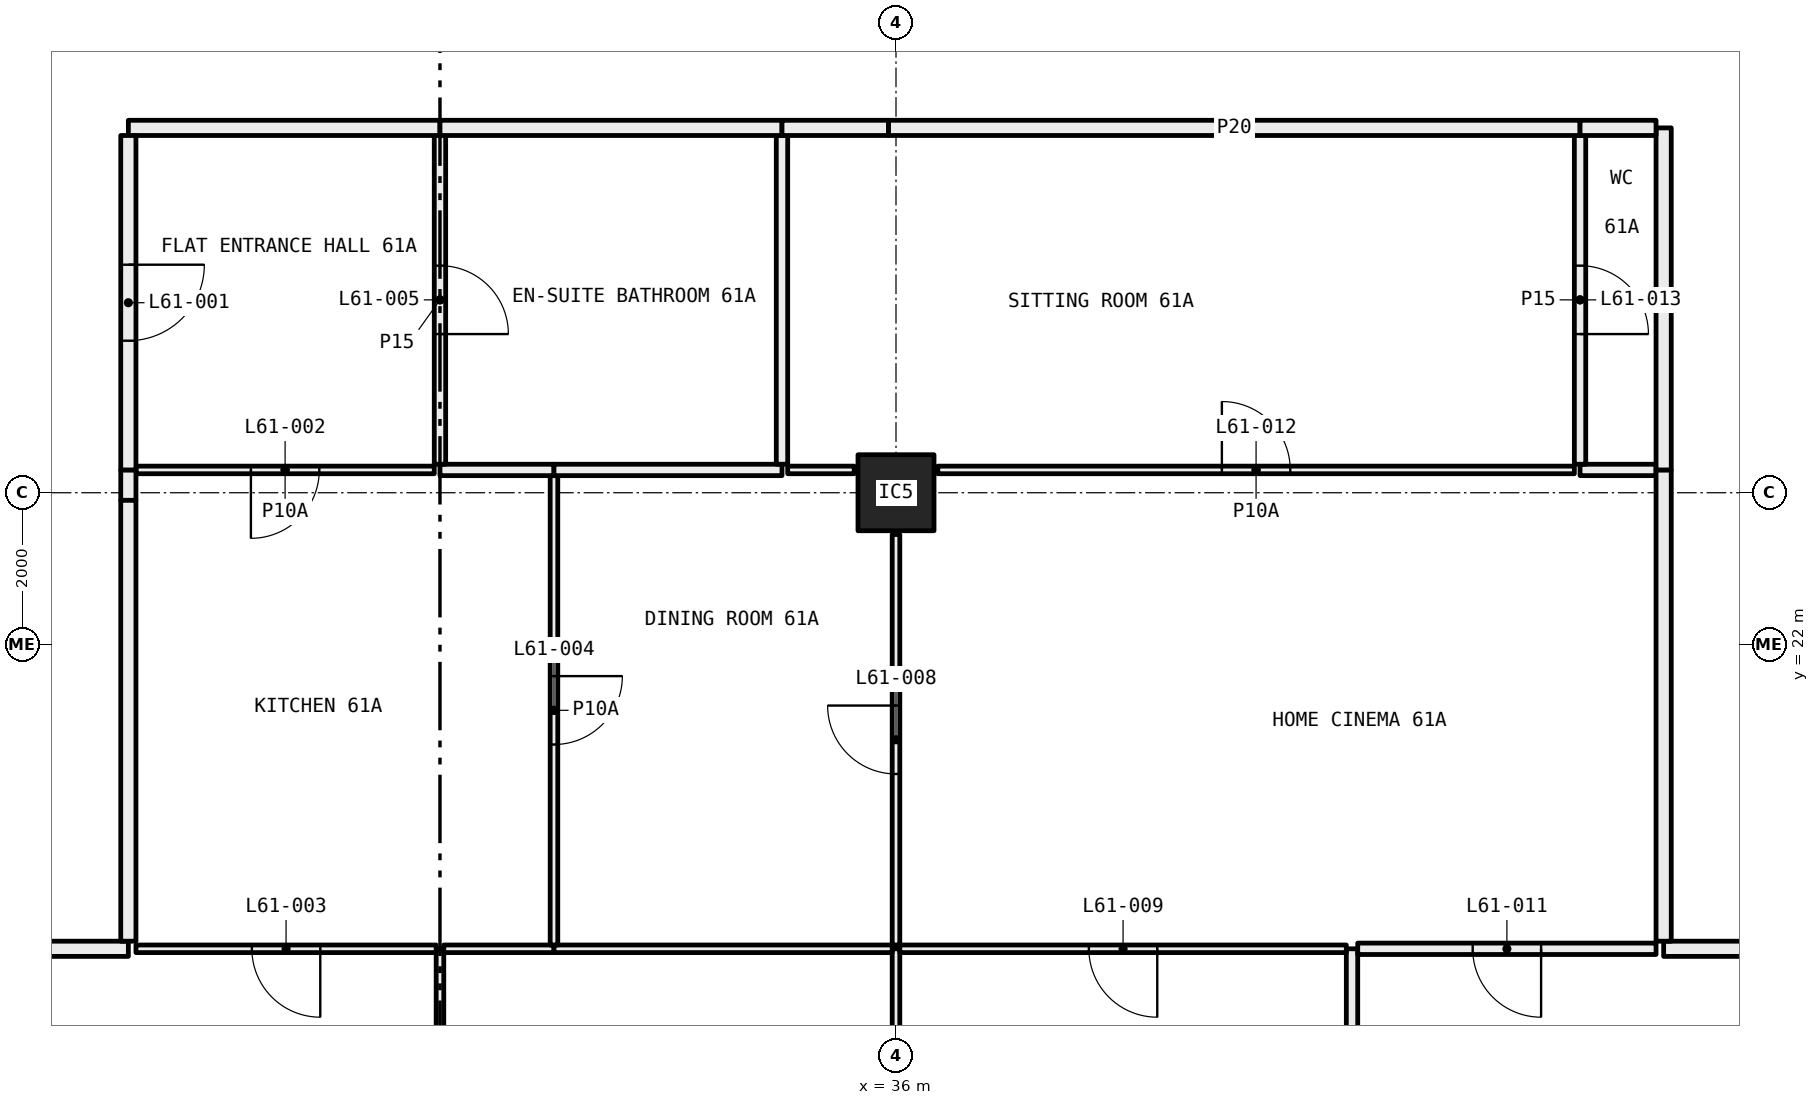
"""IFC4 building model, lengths in metres.
Left out: names, types, materials, properties, quantities, classifications, styles, units other than length and angle.
Written with IfcOpenShell. Run it as: python <this file> out.ifc"""

import sys

from ifc_helpers import new_model, si_unit, direction, frame, frame_2d, origin, origin_2d, place, context, subcontext, project, spatial, rectangle, hollow_rectangle, extrude, element, fill, save


model = new_model("IFC4")
c1 = context("Model", 3, precision=1e-05, world=origin(), true_north=direction((0.0, 1.0)))
c2 = subcontext(c1, "Body", "Model", "MODEL_VIEW")
j1 = project(units=[si_unit("LENGTHUNIT", "METRE"), si_unit("PLANEANGLEUNIT", "RADIAN")], contexts=[c1])
p1 = place(None, origin())
s1 = spatial("IfcSite", under=j1, at=p1, CompositionType="ELEMENT")
p2 = place(p1, origin())
s2 = spatial("IfcBuilding", under=s1, at=p2, CompositionType="ELEMENT")
p3 = place(p2, frame((0.0, 0.0, 228.3)))
s3 = spatial("IfcBuildingStorey", under=s2, at=p3, CompositionType="ELEMENT", Elevation=228.3)
p4 = place(p3, frame((36.0, 24.0, 0.0), z_axis=(0.0, 0.0, 1.0), x_axis=(1.0, 0.0, 0.0)))
e1 = element("IfcColumn", 1, at=p4, inside=s3, PredefinedType="COLUMN", context=c2, shape_type="SweptSolid", body=[
    extrude(hollow_rectangle(XDim=1.0, YDim=1.0, WallThickness=0.04, at=origin_2d()), origin(), (0.0, 0.0, 1.0), 3.05),
])
p5 = place(p3, frame((30.0, 12.72, 0.0), z_axis=(0.0, 0.0, 1.0), x_axis=(0.0, 1.0, 0.0)))
e2 = element("IfcWall", 2, at=p5, inside=s3, PredefinedType="PARTITIONING", context=c2, shape_type="SweptSolid", body=[
    extrude(rectangle(XDim=5.28, YDim=0.1, at=frame_2d((2.64, 0.0))), origin(), (0.0, 0.0, 1.0), 3.05),
])
p6 = place(p5, frame((2.19, 0.0, 0.0)))
e3 = element("IfcOpeningElement", 3, at=p6, cuts=e2, PredefinedType="OPENING", context=c2, shape_type="SweptSolid", body=[
    extrude(rectangle(XDim=0.9, YDim=2.1, at=frame_2d((0.45, 1.05))), frame((0.0, 0.06, 0.0), z_axis=(0.0, -1.0, 0.0), x_axis=(1.0, 0.0, 0.0)), (0.0, 0.0, 1.0), 0.12),
])
p7 = place(p3, frame((29.95, 18.0, 0.0), z_axis=(0.0, 0.0, 1.0), x_axis=(-1.0, 0.0, 0.0)))
e4 = element("IfcWall", 4, at=p7, inside=s3, PredefinedType="PARTITIONING", context=c2, shape_type="SweptSolid", body=[
    extrude(rectangle(XDim=3.95, YDim=0.1, at=frame_2d((1.975, 0.0))), origin(), (0.0, 0.0, 1.0), 3.05),
])
p8 = place(p7, frame((1.525, 0.0, 0.0)))
e5 = element("IfcOpeningElement", 5, at=p8, cuts=e4, PredefinedType="OPENING", context=c2, shape_type="SweptSolid", body=[
    extrude(rectangle(XDim=0.9, YDim=2.1, at=frame_2d((0.45, 1.05))), frame((0.0, 0.06, 0.0), z_axis=(0.0, -1.0, 0.0), x_axis=(1.0, 0.0, 0.0)), (0.0, 0.0, 1.0), 0.12),
])
p9 = place(p3, frame((25.9, 18.0, 0.0), z_axis=(0.0, 0.0, 1.0), x_axis=(-1.0, 0.0, 0.0)))
e6 = element("IfcWall", 6, at=p9, inside=s3, PredefinedType="PARTITIONING", context=c2, shape_type="SweptSolid", body=[
    extrude(rectangle(XDim=1.9, YDim=0.2, at=frame_2d((0.95, 0.0))), origin(), (0.0, 0.0, 1.0), 3.05),
])
p10 = place(p3, frame((36.0, 12.72, 0.0), z_axis=(0.0, 0.0, 1.0), x_axis=(0.0, 1.0, 0.0)))
e7 = element("IfcWall", 7, at=p10, inside=s3, PredefinedType="PARTITIONING", context=c2, shape_type="SweptSolid", body=[
    extrude(rectangle(XDim=5.28, YDim=0.1, at=frame_2d((2.64, 0.0))), origin(), (0.0, 0.0, 1.0), 2.45),
])
p11 = place(p3, frame((31.5, 18.0, 0.0), z_axis=(0.0, 0.0, 1.0), x_axis=(-1.0, 0.0, 0.0)))
e8 = element("IfcWall", 8, at=p11, inside=s3, PredefinedType="PARTITIONING", context=c2, shape_type="SweptSolid", body=[
    extrude(rectangle(XDim=1.45, YDim=0.1, at=frame_2d((0.725, 0.0))), origin(), (0.0, 0.0, 1.0), 3.05),
])
p12 = place(p3, frame((35.95, 18.0, 0.0), z_axis=(0.0, 0.0, 1.0), x_axis=(-1.0, 0.0, 0.0)))
e9 = element("IfcWall", 9, at=p12, inside=s3, PredefinedType="PARTITIONING", context=c2, shape_type="SweptSolid", body=[
    extrude(rectangle(XDim=4.45, YDim=0.1, at=frame_2d((2.225, 0.0))), origin(), (0.0, 0.0, 1.0), 2.45),
])
p13 = place(p3, frame((42.0, 15.0, 0.0), z_axis=(0.0, 0.0, 1.0), x_axis=(0.0, 1.0, 0.0)))
e10 = element("IfcWall", 10, at=p13, inside=s3, PredefinedType="PARTITIONING", context=c2, shape_type="SweptSolid", body=[
    extrude(rectangle(XDim=3.0, YDim=0.15, at=frame_2d((1.5, 0.0))), origin(), (0.0, 0.0, 1.0), 3.05),
])
p14 = place(p3, frame((41.925, 18.0, 0.0), z_axis=(0.0, 0.0, 1.0), x_axis=(-1.0, 0.0, 0.0)))
e11 = element("IfcWall", 11, at=p14, inside=s3, PredefinedType="PARTITIONING", context=c2, shape_type="SweptSolid", body=[
    extrude(rectangle(XDim=5.875, YDim=0.1, at=frame_2d((2.938, 0.0))), origin(), (0.0, 0.0, 1.0), 2.45),
])
p15 = place(p14, frame((2.488, 0.0, 0.0)))
e12 = element("IfcOpeningElement", 12, at=p15, cuts=e11, PredefinedType="OPENING", context=c2, shape_type="SweptSolid", body=[
    extrude(rectangle(XDim=0.9, YDim=2.1, at=frame_2d((0.45, 1.05))), frame((0.0, 0.06, 0.0), z_axis=(0.0, -1.0, 0.0), x_axis=(1.0, 0.0, 0.0)), (0.0, 0.0, 1.0), 0.12),
])
p16 = place(p3, frame((46.0, 18.0, 0.0), z_axis=(0.0, 0.0, 1.0), x_axis=(-1.0, 0.0, 0.0)))
e13 = element("IfcWall", 13, at=p16, inside=s3, PredefinedType="PARTITIONING", context=c2, shape_type="SweptSolid", body=[
    extrude(rectangle(XDim=3.925, YDim=0.15, at=frame_2d((1.962, 0.0))), origin(), (0.0, 0.0, 1.0), 3.05),
])
p17 = place(p16, frame((1.512, 0.0, 0.0)))
e14 = element("IfcOpeningElement", 14, at=p17, cuts=e13, PredefinedType="OPENING", context=c2, shape_type="SweptSolid", body=[
    extrude(rectangle(XDim=0.9, YDim=2.1, at=frame_2d((0.45, 1.05))), frame((0.0, 0.085, 0.0), z_axis=(0.0, -1.0, 0.0), x_axis=(1.0, 0.0, 0.0)), (0.0, 0.0, 1.0), 0.17),
])
p18 = place(p3, frame((47.9, 18.0, 0.0), z_axis=(0.0, 0.0, 1.0), x_axis=(-1.0, 0.0, 0.0)))
e15 = element("IfcWall", 15, at=p18, inside=s3, PredefinedType="PARTITIONING", context=c2, shape_type="SweptSolid", body=[
    extrude(rectangle(XDim=1.8, YDim=0.2, at=frame_2d((0.9, 0.0))), origin(), (0.0, 0.0, 1.0), 3.05),
])
p19 = place(p3, frame((31.5, 18.05, 0.0), z_axis=(0.0, 0.0, 1.0), x_axis=(0.0, 1.0, 0.0)))
e16 = element("IfcWall", 16, at=p19, inside=s3, PredefinedType="PARTITIONING", context=c2, shape_type="SweptSolid", body=[
    extrude(rectangle(XDim=6.175, YDim=0.1, at=frame_2d((3.087, 0.0))), origin(), (0.0, 0.0, 1.0), 2.45),
])
p20 = place(p19, frame((2.637, 0.0, 0.0)))
e17 = element("IfcOpeningElement", 17, at=p20, cuts=e16, PredefinedType="OPENING", context=c2, shape_type="SweptSolid", body=[
    extrude(rectangle(XDim=0.9, YDim=2.1, at=frame_2d((0.45, 1.05))), frame((0.0, 0.06, 0.0), z_axis=(0.0, -1.0, 0.0), x_axis=(1.0, 0.0, 0.0)), (0.0, 0.0, 1.0), 0.12),
])
p21 = place(p3, frame((29.925, 24.3, 0.0), z_axis=(0.0, 0.0, 1.0), x_axis=(-1.0, 0.0, 0.0)))
e18 = element("IfcWall", 18, at=p21, inside=s3, PredefinedType="PARTITIONING", context=c2, shape_type="SweptSolid", body=[
    extrude(rectangle(XDim=3.925, YDim=0.1, at=frame_2d((1.962, 0.0))), origin(), (0.0, 0.0, 1.0), 3.05),
])
p22 = place(p21, frame((1.512, 0.0, 0.0)))
e19 = element("IfcOpeningElement", 19, at=p22, cuts=e18, PredefinedType="OPENING", context=c2, shape_type="SweptSolid", body=[
    extrude(rectangle(XDim=0.9, YDim=2.1, at=frame_2d((0.45, 1.05))), frame((0.0, 0.06, 0.0), z_axis=(0.0, -1.0, 0.0), x_axis=(1.0, 0.0, 0.0)), (0.0, 0.0, 1.0), 0.12),
])
p23 = place(p3, frame((31.5, 24.3, 0.0), z_axis=(0.0, 0.0, 1.0), x_axis=(-1.0, 0.0, 0.0)))
e20 = element("IfcWall", 20, at=p23, inside=s3, PredefinedType="PARTITIONING", context=c2, shape_type="SweptSolid", body=[
    extrude(rectangle(XDim=1.5, YDim=0.15, at=frame_2d((0.75, 0.0))), origin(), (0.0, 0.0, 1.0), 3.05),
])
p24 = place(p3, frame((25.9, 24.3, 0.0), z_axis=(0.0, 0.0, 1.0), x_axis=(0.0, -1.0, 0.0)))
e21 = element("IfcWall", 21, at=p24, inside=s3, PredefinedType="PARTITIONING", context=c2, shape_type="SweptSolid", body=[
    extrude(rectangle(XDim=0.4, YDim=0.2, at=frame_2d((0.2, 0.0))), origin(), (0.0, 0.0, 1.0), 2.45),
])
p25 = place(p3, frame((25.9, 23.9, 0.0), z_axis=(0.0, 0.0, 1.0), x_axis=(0.0, -1.0, 0.0)))
e22 = element("IfcWall", 22, at=p25, inside=s3, PredefinedType="PARTITIONING", context=c2, shape_type="SweptSolid", body=[
    extrude(rectangle(XDim=5.8, YDim=0.2, at=frame_2d((2.9, 0.0))), origin(), (0.0, 0.0, 1.0), 3.05),
])
p26 = place(p3, frame((36.0, 18.05, 0.0), z_axis=(0.0, 0.0, 1.0), x_axis=(0.0, 1.0, 0.0)))
e23 = element("IfcWall", 23, at=p26, inside=s3, PredefinedType="PARTITIONING", context=c2, shape_type="SweptSolid", body=[
    extrude(rectangle(XDim=5.4, YDim=0.1, at=frame_2d((2.7, 0.0))), origin(), (0.0, 0.0, 1.0), 2.45),
])
p27 = place(p26, frame((2.25, 0.0, 0.0)))
e24 = element("IfcOpeningElement", 24, at=p27, cuts=e23, PredefinedType="OPENING", context=c2, shape_type="SweptSolid", body=[
    extrude(rectangle(XDim=0.9, YDim=2.1, at=frame_2d((0.45, 1.05))), frame((0.0, 0.06, 0.0), z_axis=(0.0, -1.0, 0.0), x_axis=(1.0, 0.0, 0.0)), (0.0, 0.0, 1.0), 0.12),
])
p28 = place(p3, frame((34.5, 24.3, 0.0), z_axis=(0.0, 0.0, 1.0), x_axis=(-1.0, 0.0, 0.0)))
e25 = element("IfcWall", 25, at=p28, inside=s3, PredefinedType="PARTITIONING", context=c2, shape_type="SweptSolid", body=[
    extrude(rectangle(XDim=3.0, YDim=0.15, at=frame_2d((1.5, 0.0))), origin(), (0.0, 0.0, 1.0), 3.05),
])
p29 = place(p3, frame((35.45, 24.3, 0.0), z_axis=(0.0, 0.0, 1.0), x_axis=(-1.0, 0.0, 0.0)))
e26 = element("IfcWall", 26, at=p29, inside=s3, PredefinedType="PARTITIONING", context=c2, shape_type="SweptSolid", body=[
    extrude(rectangle(XDim=0.875, YDim=0.1, at=frame_2d((0.438, 0.0))), origin(), (0.0, 0.0, 1.0), 3.05),
])
p30 = place(p3, frame((44.925, 24.3, 0.0), z_axis=(0.0, 0.0, 1.0), x_axis=(-1.0, 0.0, 0.0)))
e27 = element("IfcWall", 27, at=p30, inside=s3, PredefinedType="PARTITIONING", context=c2, shape_type="SweptSolid", body=[
    extrude(rectangle(XDim=8.375, YDim=0.1, at=frame_2d((4.188, 0.0))), origin(), (0.0, 0.0, 1.0), 3.05),
])
p31 = place(p30, frame((3.738, 0.0, 0.0)))
e28 = element("IfcOpeningElement", 28, at=p31, cuts=e27, PredefinedType="OPENING", context=c2, shape_type="SweptSolid", body=[
    extrude(rectangle(XDim=0.9, YDim=2.1, at=frame_2d((0.45, 1.05))), frame((0.0, 0.06, 0.0), z_axis=(0.0, -1.0, 0.0), x_axis=(1.0, 0.0, 0.0)), (0.0, 0.0, 1.0), 0.12),
])
p32 = place(p3, frame((46.0, 24.3, 0.0), z_axis=(0.0, 0.0, 1.0), x_axis=(-1.0, 0.0, 0.0)))
e29 = element("IfcWall", 29, at=p32, inside=s3, PredefinedType="PARTITIONING", context=c2, shape_type="SweptSolid", body=[
    extrude(rectangle(XDim=1.0, YDim=0.15, at=frame_2d((0.5, 0.0))), origin(), (0.0, 0.0, 1.0), 3.05),
])
p33 = place(p3, frame((46.1, 18.1, 0.0), z_axis=(0.0, 0.0, 1.0), x_axis=(0.0, 1.0, 0.0)))
e30 = element("IfcWall", 30, at=p33, inside=s3, PredefinedType="PARTITIONING", context=c2, shape_type="SweptSolid", body=[
    extrude(rectangle(XDim=6.2, YDim=0.2, at=frame_2d((3.1, 0.0))), origin(), (0.0, 0.0, 1.0), 2.45),
])
p34 = place(p3, frame((30.0, 24.375, 0.0), z_axis=(0.0, 0.0, 1.0), x_axis=(0.0, 1.0, 0.0)))
e31 = element("IfcWall", 31, at=p34, inside=s3, PredefinedType="PARTITIONING", context=c2, shape_type="SweptSolid", body=[
    extrude(rectangle(XDim=4.325, YDim=0.15, at=frame_2d((2.163, 0.0))), origin(), (0.0, 0.0, 1.0), 3.05),
])
p35 = place(p34, frame((1.712, 0.0, 0.0)))
e32 = element("IfcOpeningElement", 32, at=p35, cuts=e31, PredefinedType="OPENING", context=c2, shape_type="SweptSolid", body=[
    extrude(rectangle(XDim=0.9, YDim=2.1, at=frame_2d((0.45, 1.05))), frame((0.0, 0.085, 0.0), z_axis=(0.0, -1.0, 0.0), x_axis=(1.0, 0.0, 0.0)), (0.0, 0.0, 1.0), 0.17),
])
p36 = place(p3, frame((30.0, 28.8, 0.0), z_axis=(0.0, 0.0, 1.0), x_axis=(-1.0, 0.0, 0.0)))
e33 = element("IfcWall", 33, at=p36, inside=s3, PredefinedType="PARTITIONING", context=c2, shape_type="SweptSolid", body=[
    extrude(rectangle(XDim=4.1, YDim=0.2, at=frame_2d((2.05, 0.0))), origin(), (0.0, 0.0, 1.0), 3.05),
])
p37 = place(p3, frame((25.9, 28.7, 0.0), z_axis=(0.0, 0.0, 1.0), x_axis=(0.0, -1.0, 0.0)))
e34 = element("IfcWall", 34, at=p37, inside=s3, PredefinedType="PARTITIONING", context=c2, shape_type="SweptSolid", body=[
    extrude(rectangle(XDim=4.4, YDim=0.2, at=frame_2d((2.2, 0.0))), origin(), (0.0, 0.0, 1.0), 3.05),
])
p38 = place(p37, frame((1.7, 0.0, 0.0)))
e35 = element("IfcOpeningElement", 35, at=p38, cuts=e34, PredefinedType="OPENING", context=c2, shape_type="SweptSolid", body=[
    extrude(rectangle(XDim=1.0, YDim=2.1, at=frame_2d((0.5, 1.05))), frame((0.0, 0.11, 0.0), z_axis=(0.0, -1.0, 0.0), x_axis=(1.0, 0.0, 0.0)), (0.0, 0.0, 1.0), 0.22),
])
p39 = place(p3, frame((34.5, 24.375, 0.0), z_axis=(0.0, 0.0, 1.0), x_axis=(0.0, 1.0, 0.0)))
e36 = element("IfcWall", 36, at=p39, inside=s3, PredefinedType="PARTITIONING", context=c2, shape_type="SweptSolid", body=[
    extrude(rectangle(XDim=4.325, YDim=0.15, at=frame_2d((2.163, 0.0))), origin(), (0.0, 0.0, 1.0), 3.05),
])
p40 = place(p3, frame((34.5, 28.8, 0.0), z_axis=(0.0, 0.0, 1.0), x_axis=(-1.0, 0.0, 0.0)))
e37 = element("IfcWall", 37, at=p40, inside=s3, PredefinedType="PARTITIONING", context=c2, shape_type="SweptSolid", body=[
    extrude(rectangle(XDim=4.5, YDim=0.2, at=frame_2d((2.25, 0.0))), origin(), (0.0, 0.0, 1.0), 3.05),
])
p41 = place(p3, frame((45.0, 24.375, 0.0), z_axis=(0.0, 0.0, 1.0), x_axis=(0.0, 1.0, 0.0)))
e38 = element("IfcWall", 38, at=p41, inside=s3, PredefinedType="PARTITIONING", context=c2, shape_type="SweptSolid", body=[
    extrude(rectangle(XDim=4.325, YDim=0.15, at=frame_2d((2.163, 0.0))), origin(), (0.0, 0.0, 1.0), 3.05),
])
p42 = place(p41, frame((1.712, 0.0, 0.0)))
e39 = element("IfcOpeningElement", 39, at=p42, cuts=e38, PredefinedType="OPENING", context=c2, shape_type="SweptSolid", body=[
    extrude(rectangle(XDim=0.9, YDim=2.1, at=frame_2d((0.45, 1.05))), frame((0.0, 0.085, 0.0), z_axis=(0.0, -1.0, 0.0), x_axis=(1.0, 0.0, 0.0)), (0.0, 0.0, 1.0), 0.17),
])
p43 = place(p3, frame((45.0, 28.8, 0.0), z_axis=(0.0, 0.0, 1.0), x_axis=(-1.0, 0.0, 0.0)))
e40 = element("IfcWall", 40, at=p43, inside=s3, PredefinedType="PARTITIONING", context=c2, shape_type="SweptSolid", body=[
    extrude(rectangle(XDim=9.1, YDim=0.2, at=frame_2d((4.55, 0.0))), origin(), (0.0, 0.0, 1.0), 2.45),
])
p44 = place(p3, frame((35.9, 28.8, 0.0), z_axis=(0.0, 0.0, 1.0), x_axis=(-1.0, 0.0, 0.0)))
e41 = element("IfcWall", 41, at=p44, inside=s3, PredefinedType="PARTITIONING", context=c2, shape_type="SweptSolid", body=[
    extrude(rectangle(XDim=1.4, YDim=0.2, at=frame_2d((0.7, 0.0))), origin(), (0.0, 0.0, 1.0), 3.05),
])
p45 = place(p3, frame((46.1, 24.3, 0.0), z_axis=(0.0, 0.0, 1.0), x_axis=(0.0, 1.0, 0.0)))
e42 = element("IfcWall", 42, at=p45, inside=s3, PredefinedType="PARTITIONING", context=c2, shape_type="SweptSolid", body=[
    extrude(rectangle(XDim=4.5, YDim=0.2, at=frame_2d((2.25, 0.0))), origin(), (0.0, 0.0, 1.0), 3.05),
])
p46 = place(p3, frame((46.0, 28.8, 0.0), z_axis=(0.0, 0.0, 1.0), x_axis=(-1.0, 0.0, 0.0)))
e43 = element("IfcWall", 43, at=p46, inside=s3, PredefinedType="PARTITIONING", context=c2, shape_type="SweptSolid", body=[
    extrude(rectangle(XDim=1.0, YDim=0.2, at=frame_2d((0.5, 0.0))), origin(), (0.0, 0.0, 1.0), 3.05),
])
p47 = place(p38, origin())
e44 = element("IfcDoor", 44, at=p47, inside=s3, OperationType="SINGLE_SWING_RIGHT", PredefinedType="DOOR", context=c2, shape_type="SweptSolid", body=[
    extrude(rectangle(XDim=1.0, YDim=2.1, at=frame_2d((0.5, 1.05))), frame((0.0, 0.025, 0.0), z_axis=(0.0, -1.0, 0.0), x_axis=(1.0, 0.0, 0.0)), (0.0, 0.0, 1.0), 0.05),
])
fill(e35, e44)
p48 = place(p22, origin())
e45 = element("IfcDoor", 45, at=p48, inside=s3, OperationType="SINGLE_SWING_LEFT", PredefinedType="DOOR", context=c2, shape_type="SweptSolid", body=[
    extrude(rectangle(XDim=0.9, YDim=2.1, at=frame_2d((0.45, 1.05))), frame((0.0, 0.025, 0.0), z_axis=(0.0, -1.0, 0.0), x_axis=(1.0, 0.0, 0.0)), (0.0, 0.0, 1.0), 0.05),
])
fill(e19, e45)
p49 = place(p8, origin())
e46 = element("IfcDoor", 46, at=p49, inside=s3, OperationType="SINGLE_SWING_RIGHT", PredefinedType="DOOR", context=c2, shape_type="SweptSolid", body=[
    extrude(rectangle(XDim=0.9, YDim=2.1, at=frame_2d((0.45, 1.05))), frame((0.0, 0.025, 0.0), z_axis=(0.0, -1.0, 0.0), x_axis=(1.0, 0.0, 0.0)), (0.0, 0.0, 1.0), 0.05),
])
fill(e5, e46)
p50 = place(p20, frame((0.9, 0.0, 0.0), x_axis=(-1.0, 0.0, 0.0)))
e47 = element("IfcDoor", 47, at=p50, inside=s3, OperationType="SINGLE_SWING_RIGHT", PredefinedType="DOOR", context=c2, shape_type="SweptSolid", body=[
    extrude(rectangle(XDim=0.9, YDim=2.1, at=frame_2d((0.45, 1.05))), frame((0.0, 0.025, 0.0), z_axis=(0.0, -1.0, 0.0), x_axis=(1.0, 0.0, 0.0)), (0.0, 0.0, 1.0), 0.05),
])
fill(e17, e47)
p51 = place(p35, frame((0.9, 0.0, 0.0), x_axis=(-1.0, 0.0, 0.0)))
e48 = element("IfcDoor", 48, at=p51, inside=s3, OperationType="SINGLE_SWING_LEFT", PredefinedType="DOOR", context=c2, shape_type="SweptSolid", body=[
    extrude(rectangle(XDim=0.9, YDim=2.1, at=frame_2d((0.45, 1.05))), frame((0.0, 0.025, 0.0), z_axis=(0.0, -1.0, 0.0), x_axis=(1.0, 0.0, 0.0)), (0.0, 0.0, 1.0), 0.05),
])
fill(e32, e48)
p52 = place(p27, origin())
e49 = element("IfcDoor", 49, at=p52, inside=s3, OperationType="SINGLE_SWING_LEFT", PredefinedType="DOOR", context=c2, shape_type="SweptSolid", body=[
    extrude(rectangle(XDim=0.9, YDim=2.1, at=frame_2d((0.45, 1.05))), frame((0.0, 0.025, 0.0), z_axis=(0.0, -1.0, 0.0), x_axis=(1.0, 0.0, 0.0)), (0.0, 0.0, 1.0), 0.05),
])
fill(e24, e49)
p53 = place(p15, origin())
e50 = element("IfcDoor", 50, at=p53, inside=s3, OperationType="SINGLE_SWING_RIGHT", PredefinedType="DOOR", context=c2, shape_type="SweptSolid", body=[
    extrude(rectangle(XDim=0.9, YDim=2.1, at=frame_2d((0.45, 1.05))), frame((0.0, 0.025, 0.0), z_axis=(0.0, -1.0, 0.0), x_axis=(1.0, 0.0, 0.0)), (0.0, 0.0, 1.0), 0.05),
])
fill(e12, e50)
p54 = place(p17, origin())
e51 = element("IfcDoor", 51, at=p54, inside=s3, OperationType="SINGLE_SWING_RIGHT", PredefinedType="DOOR", context=c2, shape_type="SweptSolid", body=[
    extrude(rectangle(XDim=0.9, YDim=2.1, at=frame_2d((0.45, 1.05))), frame((0.0, 0.025, 0.0), z_axis=(0.0, -1.0, 0.0), x_axis=(1.0, 0.0, 0.0)), (0.0, 0.0, 1.0), 0.05),
])
fill(e14, e51)
p55 = place(p31, frame((0.9, 0.0, 0.0), x_axis=(-1.0, 0.0, 0.0)))
e52 = element("IfcDoor", 52, at=p55, inside=s3, OperationType="SINGLE_SWING_RIGHT", PredefinedType="DOOR", context=c2, shape_type="SweptSolid", body=[
    extrude(rectangle(XDim=0.9, YDim=2.1, at=frame_2d((0.45, 1.05))), frame((0.0, 0.025, 0.0), z_axis=(0.0, -1.0, 0.0), x_axis=(1.0, 0.0, 0.0)), (0.0, 0.0, 1.0), 0.05),
])
fill(e28, e52)
p56 = place(p42, frame((0.9, 0.0, 0.0), x_axis=(-1.0, 0.0, 0.0)))
e53 = element("IfcDoor", 53, at=p56, inside=s3, OperationType="SINGLE_SWING_LEFT", PredefinedType="DOOR", context=c2, shape_type="SweptSolid", body=[
    extrude(rectangle(XDim=0.9, YDim=2.1, at=frame_2d((0.45, 1.05))), frame((0.0, 0.025, 0.0), z_axis=(0.0, -1.0, 0.0), x_axis=(1.0, 0.0, 0.0)), (0.0, 0.0, 1.0), 0.05),
])
fill(e39, e53)
save(model, sys.argv[1])
